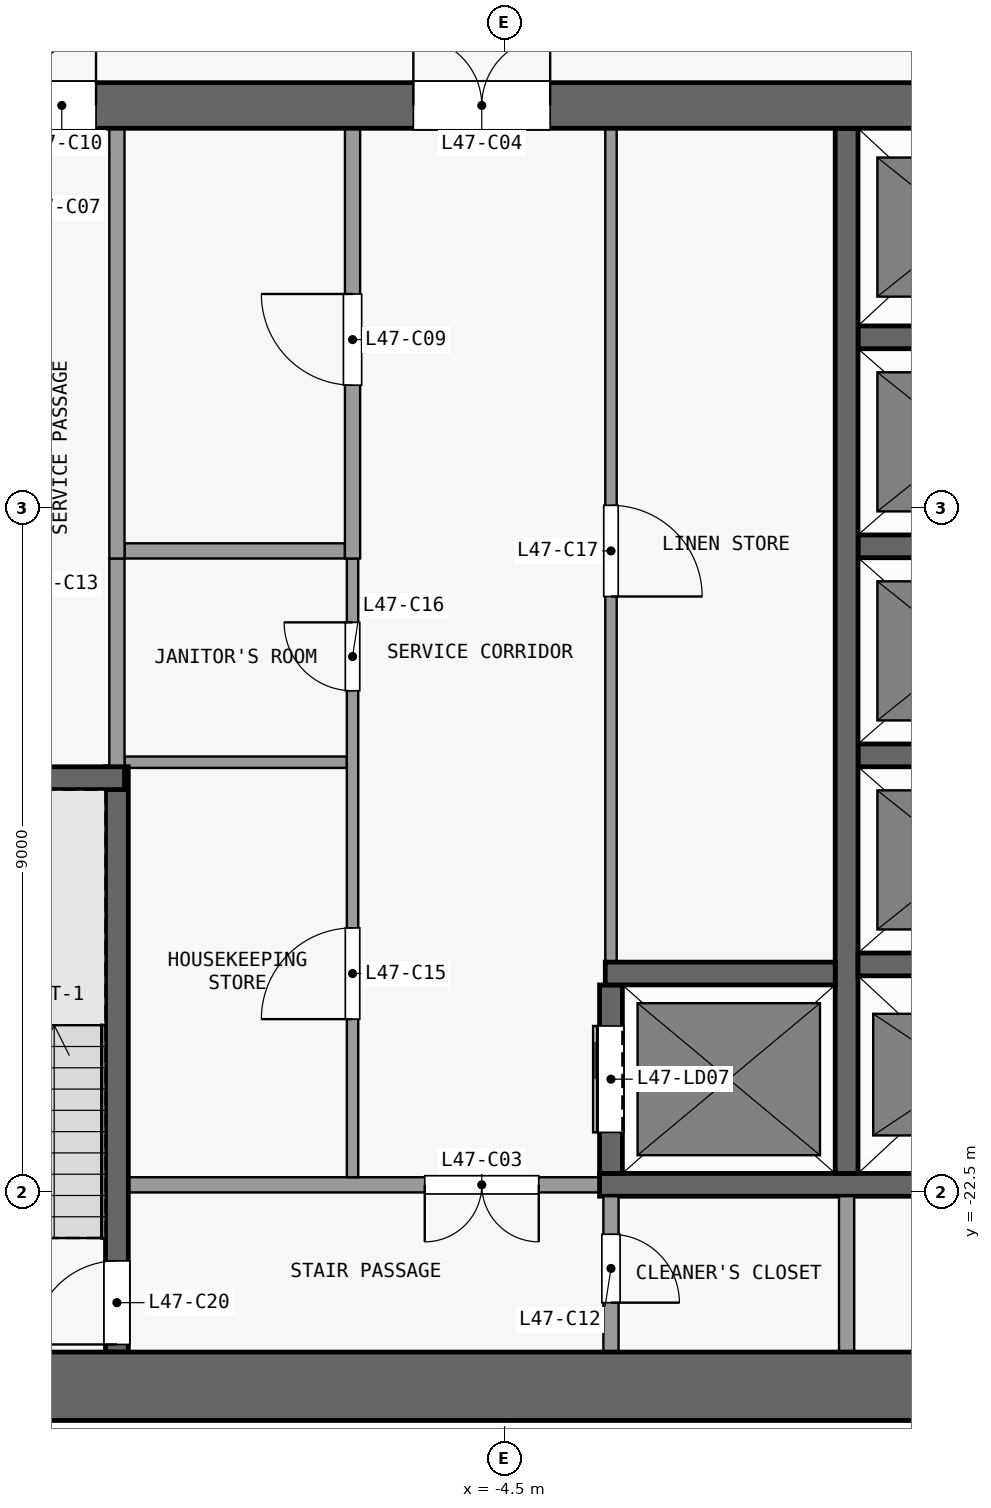
"""IFC4 building model, lengths in metres.
Left out: names, types, materials, properties, quantities, classifications, styles, units other than length and angle.
Written with IfcOpenShell. Run it as: python <this file> out.ifc"""

import sys

from ifc_helpers import new_model, si_unit, direction, frame, frame_2d, origin, place, context, subcontext, project, spatial, rectangle, extrude, element, fill, save


model = new_model("IFC4")
c1 = context("Model", 3, precision=1e-05, world=origin(), true_north=direction((0.0, 1.0)))
c2 = subcontext(c1, "Body", "Model", "MODEL_VIEW")
j1 = project(units=[si_unit("LENGTHUNIT", "METRE"), si_unit("PLANEANGLEUNIT", "RADIAN")], contexts=[c1])
p1 = place(None, origin())
s1 = spatial("IfcSite", under=j1, at=p1, CompositionType="ELEMENT")
p2 = place(p1, origin())
s2 = spatial("IfcBuilding", under=s1, at=p2, CompositionType="ELEMENT")
p3 = place(p2, frame((0.0, 0.0, 188.9)))
s3 = spatial("IfcBuildingStorey", under=s2, at=p3, CompositionType="ELEMENT", Elevation=188.9)
p4 = place(p3, frame((-13.3, -25.05, 0.0), z_axis=(0.0, 0.0, 1.0), x_axis=(1.0, 0.0, 0.0)))
e1 = element("IfcWall", 1, at=p4, inside=s3, PredefinedType="SHEAR", context=c2, shape_type="SweptSolid", body=[
    extrude(rectangle(XDim=26.6, YDim=0.9, at=frame_2d((13.3, 0.0))), origin(), (0.0, 0.0, 1.0), 3.3),
])
p5 = place(p3, frame((-13.3, -8.2, 0.0), z_axis=(0.0, 0.0, 1.0), x_axis=(1.0, 0.0, 0.0)))
e2 = element("IfcWall", 2, at=p5, inside=s3, PredefinedType="SHEAR", context=c2, shape_type="SweptSolid", body=[
    extrude(rectangle(XDim=26.6, YDim=0.6, at=frame_2d((13.3, 0.0))), origin(), (0.0, 0.0, 1.0), 3.3),
])
p6 = place(p5, frame((7.6, 0.0, 0.0)))
e3 = element("IfcOpeningElement", 3, at=p6, cuts=e2, PredefinedType="OPENING", context=c2, shape_type="SweptSolid", body=[
    extrude(rectangle(XDim=1.8, YDim=2.1, at=frame_2d((0.9, 1.05))), frame((0.0, 0.31, 0.0), z_axis=(0.0, -1.0, 0.0), x_axis=(1.0, 0.0, 0.0)), (0.0, 0.0, 1.0), 0.62),
])
p7 = place(p5, frame((17.2, 0.0, 0.0)))
e4 = element("IfcOpeningElement", 4, at=p7, cuts=e2, PredefinedType="OPENING", context=c2, shape_type="SweptSolid", body=[
    extrude(rectangle(XDim=1.8, YDim=2.1, at=frame_2d((0.9, 1.05))), frame((0.0, 0.31, 0.0), z_axis=(0.0, -1.0, 0.0), x_axis=(1.0, 0.0, 0.0)), (0.0, 0.0, 1.0), 0.62),
])
p8 = place(p5, frame((2.525, 0.0, 0.0)))
e5 = element("IfcOpeningElement", 5, at=p8, cuts=e2, PredefinedType="OPENING", context=c2, shape_type="SweptSolid", body=[
    extrude(rectangle(XDim=0.9, YDim=2.1, at=frame_2d((0.45, 1.05))), frame((0.0, 0.31, 0.0), z_axis=(0.0, -1.0, 0.0), x_axis=(1.0, 0.0, 0.0)), (0.0, 0.0, 1.0), 0.62),
])
p9 = place(p5, frame((23.175, 0.0, 0.0)))
e6 = element("IfcOpeningElement", 6, at=p9, cuts=e2, PredefinedType="OPENING", context=c2, shape_type="SweptSolid", body=[
    extrude(rectangle(XDim=0.9, YDim=2.1, at=frame_2d((0.45, 1.05))), frame((0.0, 0.31, 0.0), z_axis=(0.0, -1.0, 0.0), x_axis=(1.0, 0.0, 0.0)), (0.0, 0.0, 1.0), 0.62),
])
p10 = place(p3, frame((-3.25, -22.4, 0.0), z_axis=(0.0, 0.0, 1.0), x_axis=(-1.0, 0.0, 0.0)))
e7 = element("IfcWall", 7, at=p10, inside=s3, PredefinedType="PARTITIONING", context=c2, shape_type="SweptSolid", body=[
    extrude(rectangle(XDim=6.2, YDim=0.2, at=frame_2d((3.1, 0.0))), origin(), (0.0, 0.0, 1.0), 3.3),
])
p11 = place(p10, frame((0.8, 0.0, 0.0)))
e8 = element("IfcOpeningElement", 8, at=p11, cuts=e7, PredefinedType="OPENING", context=c2, shape_type="SweptSolid", body=[
    extrude(rectangle(XDim=1.5, YDim=2.1, at=frame_2d((0.75, 1.05))), frame((0.0, 0.11, 0.0), z_axis=(0.0, -1.0, 0.0), x_axis=(1.0, 0.0, 0.0)), (0.0, 0.0, 1.0), 0.22),
])
p12 = place(p3, frame((-3.25, -22.4, 0.0), z_axis=(0.0, 0.0, 1.0), x_axis=(1.0, 0.0, 0.0)))
e9 = element("IfcWall", 9, at=p12, inside=s3, PredefinedType="SHEAR", context=c2, shape_type="SweptSolid", body=[
    extrude(rectangle(XDim=6.2, YDim=0.3, at=frame_2d((3.1, 0.0))), origin(), (0.0, 0.0, 1.0), 3.3),
])
p13 = place(p3, frame((-3.175, -19.62, 0.0), z_axis=(0.0, 0.0, 1.0), x_axis=(1.0, 0.0, 0.0)))
e10 = element("IfcWall", 10, at=p13, inside=s3, PredefinedType="SHEAR", context=c2, shape_type="SweptSolid", body=[
    extrude(rectangle(XDim=3.025, YDim=0.3, at=frame_2d((1.513, 0.0))), origin(), (0.0, 0.0, 1.0), 3.3),
])
p14 = place(p3, frame((0.15, -19.5, 0.0), z_axis=(0.0, 0.0, 1.0), x_axis=(1.0, 0.0, 0.0)))
e11 = element("IfcWall", 11, at=p14, inside=s3, PredefinedType="SHEAR", context=c2, shape_type="SweptSolid", body=[
    extrude(rectangle(XDim=2.8, YDim=0.3, at=frame_2d((1.4, 0.0))), origin(), (0.0, 0.0, 1.0), 3.3),
])
p15 = place(p3, frame((-12.6, -17.05, 0.0), z_axis=(0.0, 0.0, 1.0), x_axis=(1.0, 0.0, 0.0)))
e12 = element("IfcWall", 12, at=p15, inside=s3, PredefinedType="SHEAR", context=c2, shape_type="SweptSolid", body=[
    extrude(rectangle(XDim=3.1, YDim=0.3, at=frame_2d((1.55, 0.0))), origin(), (0.0, 0.0, 1.0), 3.3),
])
p16 = place(p3, frame((-9.5, -16.84, 0.0), z_axis=(0.0, 0.0, 1.0), x_axis=(1.0, 0.0, 0.0)))
e13 = element("IfcWall", 13, at=p16, inside=s3, PredefinedType="PARTITIONING", context=c2, shape_type="SweptSolid", body=[
    extrude(rectangle(XDim=2.925, YDim=0.15, at=frame_2d((1.462, 0.0))), origin(), (0.0, 0.0, 1.0), 3.3),
])
p17 = place(p3, frame((0.15, -16.75, 0.0), z_axis=(0.0, 0.0, 1.0), x_axis=(1.0, 0.0, 0.0)))
e14 = element("IfcWall", 14, at=p17, inside=s3, PredefinedType="SHEAR", context=c2, shape_type="SweptSolid", body=[
    extrude(rectangle(XDim=2.8, YDim=0.3, at=frame_2d((1.4, 0.0))), origin(), (0.0, 0.0, 1.0), 3.3),
])
p18 = place(p3, frame((-9.5, -14.06, 0.0), z_axis=(0.0, 0.0, 1.0), x_axis=(1.0, 0.0, 0.0)))
e15 = element("IfcWall", 15, at=p18, inside=s3, PredefinedType="PARTITIONING", context=c2, shape_type="SweptSolid", body=[
    extrude(rectangle(XDim=2.9, YDim=0.2, at=frame_2d((1.45, 0.0))), origin(), (0.0, 0.0, 1.0), 3.3),
])
for number, where, z_axis, x_axis in (
    (16, (0.15, -14.0, 0.0), (0.0, 0.0, 1.0), (1.0, 0.0, 0.0)),
    (17, (0.15, -11.25, 0.0), (0.0, 0.0, 1.0), (1.0, 0.0, 0.0)),
):
    element("IfcWall", number, at=place(p3, frame(where, z_axis=z_axis, x_axis=x_axis)), inside=s3, PredefinedType="SHEAR", context=c2, shape_type="SweptSolid", body=[
        extrude(rectangle(XDim=2.8, YDim=0.3, at=frame_2d((1.4, 0.0))), origin(), (0.0, 0.0, 1.0), 3.3),
    ])
p19 = place(p3, frame((-9.6, -24.6, 0.0), z_axis=(0.0, 0.0, 1.0), x_axis=(0.0, 1.0, 0.0)))
e18 = element("IfcWall", 18, at=p19, inside=s3, PredefinedType="SHEAR", context=c2, shape_type="SweptSolid", body=[
    extrude(rectangle(XDim=7.7, YDim=0.3, at=frame_2d((3.85, 0.0))), origin(), (0.0, 0.0, 1.0), 3.3),
])
p20 = place(p19, frame((0.1, 0.0, 0.0)))
e19 = element("IfcOpeningElement", 19, at=p20, cuts=e18, PredefinedType="OPENING", context=c2, shape_type="SweptSolid", body=[
    extrude(rectangle(XDim=1.1, YDim=2.1, at=frame_2d((0.55, 1.05))), frame((0.0, 0.16, 0.0), z_axis=(0.0, -1.0, 0.0), x_axis=(1.0, 0.0, 0.0)), (0.0, 0.0, 1.0), 0.32),
])
p21 = place(p3, frame((-9.6, -16.9, 0.0), z_axis=(0.0, 0.0, 1.0), x_axis=(0.0, 1.0, 0.0)))
e20 = element("IfcWall", 20, at=p21, inside=s3, PredefinedType="PARTITIONING", context=c2, shape_type="SweptSolid", body=[
    extrude(rectangle(XDim=2.74, YDim=0.2, at=frame_2d((1.37, 0.0))), origin(), (0.0, 0.0, 1.0), 3.3),
])
p22 = place(p3, frame((-9.6, -14.16, 0.0), z_axis=(0.0, 0.0, 1.0), x_axis=(0.0, 1.0, 0.0)))
e21 = element("IfcWall", 21, at=p22, inside=s3, PredefinedType="PARTITIONING", context=c2, shape_type="SweptSolid", body=[
    extrude(rectangle(XDim=5.66, YDim=0.2, at=frame_2d((2.83, 0.0))), origin(), (0.0, 0.0, 1.0), 3.3),
])
p23 = place(p3, frame((-6.5, -22.3, 0.0), z_axis=(0.0, 0.0, 1.0), x_axis=(0.0, 1.0, 0.0)))
e22 = element("IfcWall", 22, at=p23, inside=s3, PredefinedType="PARTITIONING", context=c2, shape_type="SweptSolid", body=[
    extrude(rectangle(XDim=8.14, YDim=0.15, at=frame_2d((4.07, 0.0))), origin(), (0.0, 0.0, 1.0), 3.3),
])
p24 = place(p23, frame((2.08, 0.0, 0.0)))
e23 = element("IfcOpeningElement", 23, at=p24, cuts=e22, PredefinedType="OPENING", context=c2, shape_type="SweptSolid", body=[
    extrude(rectangle(XDim=1.2, YDim=2.1, at=frame_2d((0.6, 1.05))), frame((0.0, 0.085, 0.0), z_axis=(0.0, -1.0, 0.0), x_axis=(1.0, 0.0, 0.0)), (0.0, 0.0, 1.0), 0.17),
])
p25 = place(p23, frame((6.4, 0.0, 0.0)))
e24 = element("IfcOpeningElement", 24, at=p25, cuts=e22, PredefinedType="OPENING", context=c2, shape_type="SweptSolid", body=[
    extrude(rectangle(XDim=0.9, YDim=2.1, at=frame_2d((0.45, 1.05))), frame((0.0, 0.085, 0.0), z_axis=(0.0, -1.0, 0.0), x_axis=(1.0, 0.0, 0.0)), (0.0, 0.0, 1.0), 0.17),
])
p26 = place(p3, frame((-6.5, -14.16, 0.0), z_axis=(0.0, 0.0, 1.0), x_axis=(0.0, 1.0, 0.0)))
e25 = element("IfcWall", 25, at=p26, inside=s3, PredefinedType="PARTITIONING", context=c2, shape_type="SweptSolid", body=[
    extrude(rectangle(XDim=5.66, YDim=0.2, at=frame_2d((2.83, 0.0))), origin(), (0.0, 0.0, 1.0), 3.3),
])
p27 = place(p26, frame((2.28, 0.0, 0.0)))
e26 = element("IfcOpeningElement", 26, at=p27, cuts=e25, PredefinedType="OPENING", context=c2, shape_type="SweptSolid", body=[
    extrude(rectangle(XDim=1.2, YDim=2.1, at=frame_2d((0.6, 1.05))), frame((0.0, 0.11, 0.0), z_axis=(0.0, -1.0, 0.0), x_axis=(1.0, 0.0, 0.0)), (0.0, 0.0, 1.0), 0.22),
])
p28 = place(p3, frame((-3.1, -22.55, 0.0), z_axis=(0.0, 0.0, 1.0), x_axis=(0.0, -1.0, 0.0)))
e27 = element("IfcWall", 27, at=p28, inside=s3, PredefinedType="PARTITIONING", context=c2, shape_type="SweptSolid", body=[
    extrude(rectangle(XDim=2.05, YDim=0.2, at=frame_2d((1.025, 0.0))), origin(), (0.0, 0.0, 1.0), 3.3),
])
p29 = place(p28, frame((0.5, 0.0, 0.0)))
e28 = element("IfcOpeningElement", 28, at=p29, cuts=e27, PredefinedType="OPENING", context=c2, shape_type="SweptSolid", body=[
    extrude(rectangle(XDim=0.9, YDim=2.1, at=frame_2d((0.45, 1.05))), frame((0.0, 0.11, 0.0), z_axis=(0.0, -1.0, 0.0), x_axis=(1.0, 0.0, 0.0)), (0.0, 0.0, 1.0), 0.22),
])
p30 = place(p3, frame((-3.1, -22.25, 0.0), z_axis=(0.0, 0.0, 1.0), x_axis=(0.0, 1.0, 0.0)))
e29 = element("IfcWall", 29, at=p30, inside=s3, PredefinedType="SHEAR", context=c2, shape_type="SweptSolid", body=[
    extrude(rectangle(XDim=2.48, YDim=0.3, at=frame_2d((1.24, 0.0))), origin(), (0.0, 0.0, 1.0), 3.3),
])
p31 = place(p30, frame((0.54, 0.0, 0.0)))
e30 = element("IfcOpeningElement", 30, at=p31, cuts=e29, PredefinedType="OPENING", context=c2, shape_type="SweptSolid", body=[
    extrude(rectangle(XDim=1.4, YDim=2.1, at=frame_2d((0.7, 1.05))), frame((0.0, 0.16, 0.0), z_axis=(0.0, -1.0, 0.0), x_axis=(1.0, 0.0, 0.0)), (0.0, 0.0, 1.0), 0.32),
])
p32 = place(p3, frame((-3.1, -8.5, 0.0), z_axis=(0.0, 0.0, 1.0), x_axis=(0.0, -1.0, 0.0)))
e31 = element("IfcWall", 31, at=p32, inside=s3, PredefinedType="PARTITIONING", context=c2, shape_type="SweptSolid", body=[
    extrude(rectangle(XDim=10.97, YDim=0.15, at=frame_2d((5.485, 0.0))), origin(), (0.0, 0.0, 1.0), 3.3),
])
p33 = place(p32, frame((4.96, 0.0, 0.0)))
e32 = element("IfcOpeningElement", 32, at=p33, cuts=e31, PredefinedType="OPENING", context=c2, shape_type="SweptSolid", body=[
    extrude(rectangle(XDim=1.2, YDim=2.1, at=frame_2d((0.6, 1.05))), frame((0.0, 0.085, 0.0), z_axis=(0.0, -1.0, 0.0), x_axis=(1.0, 0.0, 0.0)), (0.0, 0.0, 1.0), 0.17),
])
p34 = place(p3, frame((0.0, -24.6, 0.0), z_axis=(0.0, 0.0, 1.0), x_axis=(0.0, 1.0, 0.0)))
e33 = element("IfcWall", 33, at=p34, inside=s3, PredefinedType="PARTITIONING", context=c2, shape_type="SweptSolid", body=[
    extrude(rectangle(XDim=2.05, YDim=0.2, at=frame_2d((1.025, 0.0))), origin(), (0.0, 0.0, 1.0), 3.3),
])
p35 = place(p3, frame((0.0, -22.25, 0.0), z_axis=(0.0, 0.0, 1.0), x_axis=(0.0, 1.0, 0.0)))
e34 = element("IfcWall", 34, at=p35, inside=s3, PredefinedType="SHEAR", context=c2, shape_type="SweptSolid", body=[
    extrude(rectangle(XDim=13.75, YDim=0.3, at=frame_2d((6.875, 0.0))), origin(), (0.0, 0.0, 1.0), 3.3),
])
p36 = place(p31, origin())
e35 = element("IfcDoor", 35, at=p36, inside=s3, OperationType="DOUBLE_DOOR_SLIDING", PredefinedType="DOOR", context=c2, shape_type="SweptSolid", body=[
    extrude(rectangle(XDim=1.4, YDim=2.1, at=frame_2d((0.7, 1.05))), frame((0.0, 0.025, 0.0), z_axis=(0.0, -1.0, 0.0), x_axis=(1.0, 0.0, 0.0)), (0.0, 0.0, 1.0), 0.05),
])
fill(e30, e35)
p37 = place(p11, origin())
e36 = element("IfcDoor", 36, at=p37, inside=s3, OperationType="DOUBLE_DOOR_SINGLE_SWING", PredefinedType="DOOR", context=c2, shape_type="SweptSolid", body=[
    extrude(rectangle(XDim=1.5, YDim=2.1, at=frame_2d((0.75, 1.05))), frame((0.0, 0.025, 0.0), z_axis=(0.0, -1.0, 0.0), x_axis=(1.0, 0.0, 0.0)), (0.0, 0.0, 1.0), 0.05),
])
fill(e8, e36)
p38 = place(p6, origin())
e37 = element("IfcDoor", 37, at=p38, inside=s3, OperationType="DOUBLE_DOOR_SINGLE_SWING", PredefinedType="DOOR", context=c2, shape_type="SweptSolid", body=[
    extrude(rectangle(XDim=1.8, YDim=2.1, at=frame_2d((0.9, 1.05))), frame((0.0, 0.025, 0.0), z_axis=(0.0, -1.0, 0.0), x_axis=(1.0, 0.0, 0.0)), (0.0, 0.0, 1.0), 0.05),
])
fill(e3, e37)
p39 = place(p27, origin())
e38 = element("IfcDoor", 38, at=p39, inside=s3, OperationType="SINGLE_SWING_RIGHT", PredefinedType="DOOR", context=c2, shape_type="SweptSolid", body=[
    extrude(rectangle(XDim=1.2, YDim=2.1, at=frame_2d((0.6, 1.05))), frame((0.0, 0.025, 0.0), z_axis=(0.0, -1.0, 0.0), x_axis=(1.0, 0.0, 0.0)), (0.0, 0.0, 1.0), 0.05),
])
fill(e26, e38)
p40 = place(p8, origin())
e39 = element("IfcDoor", 39, at=p40, inside=s3, OperationType="SINGLE_SWING_RIGHT", PredefinedType="DOOR", context=c2, shape_type="SweptSolid", body=[
    extrude(rectangle(XDim=0.9, YDim=2.1, at=frame_2d((0.45, 1.05))), frame((0.0, 0.025, 0.0), z_axis=(0.0, -1.0, 0.0), x_axis=(1.0, 0.0, 0.0)), (0.0, 0.0, 1.0), 0.05),
])
fill(e5, e39)
p41 = place(p29, origin())
e40 = element("IfcDoor", 40, at=p41, inside=s3, OperationType="SINGLE_SWING_RIGHT", PredefinedType="DOOR", context=c2, shape_type="SweptSolid", body=[
    extrude(rectangle(XDim=0.9, YDim=2.1, at=frame_2d((0.45, 1.05))), frame((0.0, 0.025, 0.0), z_axis=(0.0, -1.0, 0.0), x_axis=(1.0, 0.0, 0.0)), (0.0, 0.0, 1.0), 0.05),
])
fill(e28, e40)
p42 = place(p24, origin())
e41 = element("IfcDoor", 41, at=p42, inside=s3, OperationType="SINGLE_SWING_LEFT", PredefinedType="DOOR", context=c2, shape_type="SweptSolid", body=[
    extrude(rectangle(XDim=1.2, YDim=2.1, at=frame_2d((0.6, 1.05))), frame((0.0, 0.025, 0.0), z_axis=(0.0, -1.0, 0.0), x_axis=(1.0, 0.0, 0.0)), (0.0, 0.0, 1.0), 0.05),
])
fill(e23, e41)
p43 = place(p25, origin())
e42 = element("IfcDoor", 42, at=p43, inside=s3, OperationType="SINGLE_SWING_RIGHT", PredefinedType="DOOR", context=c2, shape_type="SweptSolid", body=[
    extrude(rectangle(XDim=0.9, YDim=2.1, at=frame_2d((0.45, 1.05))), frame((0.0, 0.025, 0.0), z_axis=(0.0, -1.0, 0.0), x_axis=(1.0, 0.0, 0.0)), (0.0, 0.0, 1.0), 0.05),
])
fill(e24, e42)
p44 = place(p33, origin())
e43 = element("IfcDoor", 43, at=p44, inside=s3, OperationType="SINGLE_SWING_RIGHT", PredefinedType="DOOR", context=c2, shape_type="SweptSolid", body=[
    extrude(rectangle(XDim=1.2, YDim=2.1, at=frame_2d((0.6, 1.05))), frame((0.0, 0.025, 0.0), z_axis=(0.0, -1.0, 0.0), x_axis=(1.0, 0.0, 0.0)), (0.0, 0.0, 1.0), 0.05),
])
fill(e32, e43)
p45 = place(p20, origin())
e44 = element("IfcDoor", 44, at=p45, inside=s3, OperationType="SINGLE_SWING_LEFT", PredefinedType="DOOR", context=c2, shape_type="SweptSolid", body=[
    extrude(rectangle(XDim=1.1, YDim=2.1, at=frame_2d((0.55, 1.05))), frame((0.0, 0.025, 0.0), z_axis=(0.0, -1.0, 0.0), x_axis=(1.0, 0.0, 0.0)), (0.0, 0.0, 1.0), 0.05),
])
fill(e19, e44)
save(model, sys.argv[1])
